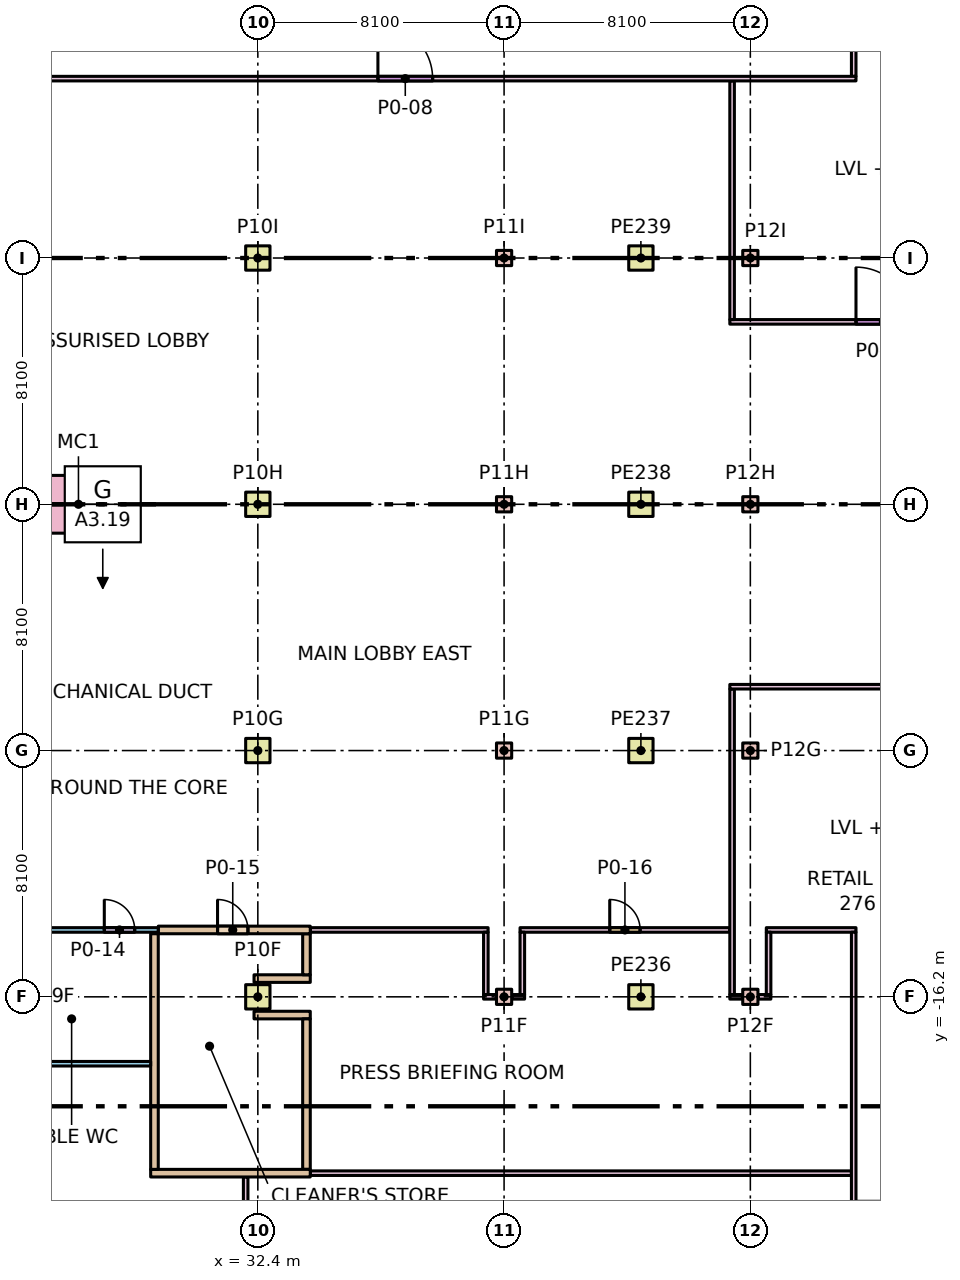
"""IFC4 building model, lengths in metres.
Left out: names, types, materials, properties, quantities, classifications, styles, units other than length and angle.
Written with IfcOpenShell. Run it as: python <this file> out.ifc"""

import sys

from ifc_helpers import new_model, si_unit, direction, frame, frame_2d, origin, origin_2d, place, context, subcontext, project, spatial, rectangle, extrude, element, fill, save


model = new_model("IFC4")
c1 = context("Model", 3, precision=1e-05, world=origin(), true_north=direction((0.0, 1.0)))
c2 = subcontext(c1, "Body", "Model", "MODEL_VIEW")
j1 = project(units=[si_unit("LENGTHUNIT", "METRE"), si_unit("PLANEANGLEUNIT", "RADIAN")], contexts=[c1])
p1 = place(None, origin())
s1 = spatial("IfcSite", under=j1, at=p1, CompositionType="ELEMENT")
p2 = place(p1, origin())
s2 = spatial("IfcBuilding", under=s1, at=p2, CompositionType="ELEMENT")
p3 = place(p2, origin())
s3 = spatial("IfcBuildingStorey", under=s2, at=p3, CompositionType="ELEMENT", Elevation=0.0)
for number, where, z_axis, x_axis in (
    (1, (32.4, -16.2, 0.0), (0.0, 0.0, 1.0), (1.0, 0.0, 0.0)),
    (2, (32.4, -8.1, 0.0), (0.0, 0.0, 1.0), (1.0, 0.0, 0.0)),
    (3, (32.4, 0.0, 0.0), (0.0, 0.0, 1.0), (1.0, 0.0, 0.0)),
    (4, (32.4, 8.1, 0.0), (0.0, 0.0, 1.0), (1.0, 0.0, 0.0)),
):
    element("IfcColumn", number, at=place(p3, frame(where, z_axis=z_axis, x_axis=x_axis)), inside=s3, PredefinedType="COLUMN", context=c2, shape_type="SweptSolid", body=[
        extrude(rectangle(XDim=0.8, YDim=0.8, at=origin_2d()), origin(), (0.0, 0.0, 1.0), 6.0),
    ])
for number, where, z_axis, x_axis in (
    (5, (40.5, -16.2, 0.0), (0.0, 0.0, 1.0), (1.0, 0.0, 0.0)),
    (6, (40.5, -8.1, 0.0), (0.0, 0.0, 1.0), (1.0, 0.0, 0.0)),
    (7, (40.5, 0.0, 0.0), (0.0, 0.0, 1.0), (1.0, 0.0, 0.0)),
    (8, (40.5, 8.1, 0.0), (0.0, 0.0, 1.0), (1.0, 0.0, 0.0)),
    (9, (48.6, -16.2, 0.0), (0.0, 0.0, 1.0), (1.0, 0.0, 0.0)),
    (10, (48.6, -8.1, 0.0), (0.0, 0.0, 1.0), (1.0, 0.0, 0.0)),
    (11, (48.6, 0.0, 0.0), (0.0, 0.0, 1.0), (1.0, 0.0, 0.0)),
    (12, (48.6, 8.1, 0.0), (0.0, 0.0, 1.0), (1.0, 0.0, 0.0)),
):
    element("IfcColumn", number, at=place(p3, frame(where, z_axis=z_axis, x_axis=x_axis)), inside=s3, PredefinedType="COLUMN", context=c2, shape_type="SweptSolid", body=[
        extrude(rectangle(XDim=0.5, YDim=0.5, at=origin_2d()), origin(), (0.0, 0.0, 1.0), 6.0),
    ])
for number, where, z_axis, x_axis in (
    (13, (45.0, -16.2, 0.0), (0.0, 0.0, 1.0), (1.0, 0.0, 0.0)),
    (14, (45.0, -8.1, 0.0), (0.0, 0.0, 1.0), (1.0, 0.0, 0.0)),
    (15, (45.0, 0.0, 0.0), (0.0, 0.0, 1.0), (1.0, 0.0, 0.0)),
    (16, (45.0, 8.1, 0.0), (0.0, 0.0, 1.0), (1.0, 0.0, 0.0)),
):
    element("IfcColumn", number, at=place(p3, frame(where, z_axis=z_axis, x_axis=x_axis)), inside=s3, PredefinedType="COLUMN", context=c2, shape_type="SweptSolid", body=[
        extrude(rectangle(XDim=0.8, YDim=0.8, at=origin_2d()), origin(), (0.0, 0.0, 1.0), 6.0),
    ])
p4 = place(p3, frame((26.5, 0.0, 0.0), z_axis=(0.0, 0.0, 1.0), x_axis=(0.0, 1.0, 0.0)))
e17 = element("IfcColumn", 17, at=p4, inside=s3, PredefinedType="COLUMN", context=c2, shape_type="SweptSolid", body=[
    extrude(rectangle(XDim=1.9, YDim=1.9, at=origin_2d()), origin(), (0.0, 0.0, 1.0), 6.0),
])
for number, where, z_axis, x_axis in (
    (18, (39.825, -16.2, 0.0), (0.0, 0.0, 1.0), (1.0, 0.0, 0.0)),
    (19, (40.76, -16.2, 0.0), (0.0, 0.0, 1.0), (1.0, 0.0, 0.0)),
):
    element("IfcWall", number, at=place(p3, frame(where, z_axis=z_axis, x_axis=x_axis)), inside=s3, PredefinedType="PARTITIONING", context=c2, shape_type="SweptSolid", body=[
        extrude(rectangle(XDim=0.415, YDim=0.15, at=frame_2d((0.208, 0.0))), origin(), (0.0, 0.0, 1.0), 5.68),
    ])
p5 = place(p3, frame((34.125, -14.0, 0.0), z_axis=(0.0, 0.0, 1.0), x_axis=(1.0, 0.0, 0.0)))
e20 = element("IfcWall", 20, at=p5, inside=s3, PredefinedType="PARTITIONING", context=c2, shape_type="SweptSolid", body=[
    extrude(rectangle(XDim=5.85, YDim=0.15, at=frame_2d((2.925, 0.0))), origin(), (0.0, 0.0, 1.0), 5.68),
])
p6 = place(p3, frame((41.025, -14.0, 0.0), z_axis=(0.0, 0.0, 1.0), x_axis=(1.0, 0.0, 0.0)))
e21 = element("IfcWall", 21, at=p6, inside=s3, PredefinedType="PARTITIONING", context=c2, shape_type="SweptSolid", body=[
    extrude(rectangle(XDim=6.9, YDim=0.15, at=frame_2d((3.45, 0.0))), origin(), (0.0, 0.0, 1.0), 5.68),
])
p7 = place(p6, frame((2.95, 0.0, 0.0)))
e22 = element("IfcOpeningElement", 22, at=p7, cuts=e21, PredefinedType="OPENING", context=c2, shape_type="SweptSolid", body=[
    extrude(rectangle(XDim=1.0, YDim=2.1, at=frame_2d((0.5, 1.05))), frame((0.0, 0.085, 0.0), z_axis=(0.0, -1.0, 0.0), x_axis=(1.0, 0.0, 0.0)), (0.0, 0.0, 1.0), 0.17),
])
for number, where, z_axis, x_axis in (
    (23, (39.9, -16.125, 0.0), (0.0, 0.0, 1.0), (0.0, 1.0, 0.0)),
    (24, (41.1, -16.125, 0.0), (0.0, 0.0, 1.0), (0.0, 1.0, 0.0)),
):
    element("IfcWall", number, at=place(p3, frame(where, z_axis=z_axis, x_axis=x_axis)), inside=s3, PredefinedType="PARTITIONING", context=c2, shape_type="SweptSolid", body=[
        extrude(rectangle(XDim=2.05, YDim=0.15, at=frame_2d((1.025, 0.0))), origin(), (0.0, 0.0, 1.0), 5.68),
    ])
for number, where, z_axis, x_axis in (
    (25, (32.275, -16.8, 0.0), (0.0, 0.0, 1.0), (1.0, 0.0, 0.0)),
    (26, (32.275, -15.6, 0.0), (0.0, 0.0, 1.0), (1.0, 0.0, 0.0)),
):
    element("IfcWall", number, at=place(p3, frame(where, z_axis=z_axis, x_axis=x_axis)), inside=s3, PredefinedType="PARTITIONING", context=c2, shape_type="SweptSolid", body=[
        extrude(rectangle(XDim=1.85, YDim=0.25, at=frame_2d((0.925, 0.0))), origin(), (0.0, 0.0, 1.0), 5.68),
    ])
p8 = place(p3, frame((34.0, -21.875, 0.0), z_axis=(0.0, 0.0, 1.0), x_axis=(0.0, 1.0, 0.0)))
e27 = element("IfcWall", 27, at=p8, inside=s3, PredefinedType="PARTITIONING", context=c2, shape_type="SweptSolid", body=[
    extrude(rectangle(XDim=4.95, YDim=0.25, at=frame_2d((2.475, 0.0))), origin(), (0.0, 0.0, 1.0), 5.68),
])
p9 = place(p3, frame((34.0, -15.475, 0.0), z_axis=(0.0, 0.0, 1.0), x_axis=(0.0, 1.0, 0.0)))
e28 = element("IfcWall", 28, at=p9, inside=s3, PredefinedType="PARTITIONING", context=c2, shape_type="SweptSolid", body=[
    extrude(rectangle(XDim=1.35, YDim=0.25, at=frame_2d((0.675, 0.0))), origin(), (0.0, 0.0, 1.0), 5.68),
])
p10 = place(p3, frame((47.925, -16.2, 0.0), z_axis=(0.0, 0.0, 1.0), x_axis=(1.0, 0.0, 0.0)))
e29 = element("IfcWall", 29, at=p10, inside=s3, PredefinedType="PARTITIONING", context=c2, shape_type="SweptSolid", body=[
    extrude(rectangle(XDim=0.415, YDim=0.15, at=frame_2d((0.208, 0.0))), origin(), (0.0, 0.0, 1.0), 5.68),
])
p11 = place(p3, frame((48.86, -16.2, 0.0), z_axis=(0.0, 0.0, 1.0), x_axis=(1.0, 0.0, 0.0)))
e30 = element("IfcWall", 30, at=p11, inside=s3, PredefinedType="PARTITIONING", context=c2, shape_type="SweptSolid", body=[
    extrude(rectangle(XDim=0.415, YDim=0.15, at=frame_2d((0.208, 0.0))), origin(), (0.0, 0.0, 1.0), 5.68),
])
p12 = place(p3, frame((49.125, -14.0, 0.0), z_axis=(0.0, 0.0, 1.0), x_axis=(1.0, 0.0, 0.0)))
e31 = element("IfcWall", 31, at=p12, inside=s3, PredefinedType="PARTITIONING", context=c2, shape_type="SweptSolid", body=[
    extrude(rectangle(XDim=2.95, YDim=0.15, at=frame_2d((1.475, 0.0))), origin(), (0.0, 0.0, 1.0), 5.68),
])
p13 = place(p3, frame((48.0, -16.125, 0.0), z_axis=(0.0, 0.0, 1.0), x_axis=(0.0, 1.0, 0.0)))
e32 = element("IfcWall", 32, at=p13, inside=s3, PredefinedType="PARTITIONING", context=c2, shape_type="SweptSolid", body=[
    extrude(rectangle(XDim=10.05, YDim=0.15, at=frame_2d((5.025, 0.0))), origin(), (0.0, 0.0, 1.0), 5.68),
])
p14 = place(p3, frame((49.2, -16.125, 0.0), z_axis=(0.0, 0.0, 1.0), x_axis=(0.0, 1.0, 0.0)))
e33 = element("IfcWall", 33, at=p14, inside=s3, PredefinedType="PARTITIONING", context=c2, shape_type="SweptSolid", body=[
    extrude(rectangle(XDim=2.05, YDim=0.15, at=frame_2d((1.025, 0.0))), origin(), (0.0, 0.0, 1.0), 5.68),
])
p15 = place(p3, frame((34.125, -22.0, 0.0), z_axis=(0.0, 0.0, 1.0), x_axis=(1.0, 0.0, 0.0)))
e34 = element("IfcWall", 34, at=p15, inside=s3, PredefinedType="PARTITIONING", context=c2, shape_type="SweptSolid", body=[
    extrude(rectangle(XDim=17.8, YDim=0.15, at=frame_2d((8.9, 0.0))), origin(), (0.0, 0.0, 1.0), 5.68),
])
p16 = place(p3, frame((47.925, 6.0, 0.0), z_axis=(0.0, 0.0, 1.0), x_axis=(1.0, 0.0, 0.0)))
e35 = element("IfcWall", 35, at=p16, inside=s3, PredefinedType="PARTITIONING", context=c2, shape_type="SweptSolid", body=[
    extrude(rectangle(XDim=10.1, YDim=0.15, at=frame_2d((5.05, 0.0))), origin(), (0.0, 0.0, 1.0), 5.68),
])
p17 = place(p16, frame((4.15, 0.0, 0.0)))
e36 = element("IfcOpeningElement", 36, at=p17, cuts=e35, PredefinedType="OPENING", context=c2, shape_type="SweptSolid", body=[
    extrude(rectangle(XDim=1.8, YDim=2.4, at=frame_2d((0.9, 1.2))), frame((0.0, 0.085, 0.0), z_axis=(0.0, -1.0, 0.0), x_axis=(1.0, 0.0, 0.0)), (0.0, 0.0, 1.0), 0.17),
])
p18 = place(p3, frame((52.0, 14.075, 0.0), z_axis=(0.0, 0.0, 1.0), x_axis=(0.0, 1.0, 0.0)))
e37 = element("IfcWall", 37, at=p18, inside=s3, PredefinedType="PARTITIONING", context=c2, shape_type="SweptSolid", body=[
    extrude(rectangle(XDim=9.85, YDim=0.15, at=frame_2d((4.925, 0.0))), origin(), (0.0, 0.0, 1.0), 5.68),
])
p19 = place(p3, frame((48.0, 6.075, 0.0), z_axis=(0.0, 0.0, 1.0), x_axis=(0.0, 1.0, 0.0)))
e38 = element("IfcWall", 38, at=p19, inside=s3, PredefinedType="PARTITIONING", context=c2, shape_type="SweptSolid", body=[
    extrude(rectangle(XDim=7.85, YDim=0.15, at=frame_2d((3.925, 0.0))), origin(), (0.0, 0.0, 1.0), 5.68),
])
p20 = place(p3, frame((47.925, -6.0, 0.0), z_axis=(0.0, 0.0, 1.0), x_axis=(1.0, 0.0, 0.0)))
e39 = element("IfcWall", 39, at=p20, inside=s3, PredefinedType="PARTITIONING", context=c2, shape_type="SweptSolid", body=[
    extrude(rectangle(XDim=10.1, YDim=0.15, at=frame_2d((5.05, 0.0))), origin(), (0.0, 0.0, 1.0), 5.68),
])
p21 = place(p3, frame((13.475, 14.0, 0.0), z_axis=(0.0, 0.0, 1.0), x_axis=(1.0, 0.0, 0.0)))
e40 = element("IfcWall", 40, at=p21, inside=s3, PredefinedType="PARTITIONING", context=c2, shape_type="SweptSolid", body=[
    extrude(rectangle(XDim=38.6, YDim=0.15, at=frame_2d((19.3, 0.0))), origin(), (0.0, 0.0, 1.0), 5.68),
])
p22 = place(p21, frame((22.875, 0.0, 0.0)))
e41 = element("IfcOpeningElement", 41, at=p22, cuts=e40, PredefinedType="OPENING", context=c2, shape_type="SweptSolid", body=[
    extrude(rectangle(XDim=1.8, YDim=2.4, at=frame_2d((0.9, 1.2))), frame((0.0, 0.085, 0.0), z_axis=(0.0, -1.0, 0.0), x_axis=(1.0, 0.0, 0.0)), (0.0, 0.0, 1.0), 0.17),
])
p23 = place(p3, frame((13.325, -14.0, 0.0), z_axis=(0.0, 0.0, 1.0), x_axis=(1.0, 0.0, 0.0)))
e42 = element("IfcWall", 42, at=p23, inside=s3, PredefinedType="PARTITIONING", context=c2, shape_type="SweptSolid", body=[
    extrude(rectangle(XDim=15.8, YDim=0.15, at=frame_2d((7.9, 0.0))), origin(), (0.0, 0.0, 1.0), 5.68),
])
p24 = place(p23, frame((4.85, 0.0, 0.0)))
e43 = element("IfcOpeningElement", 43, at=p24, cuts=e42, PredefinedType="OPENING", context=c2, shape_type="SweptSolid", body=[
    extrude(rectangle(XDim=1.0, YDim=2.1, at=frame_2d((0.5, 1.05))), frame((0.0, 0.085, 0.0), z_axis=(0.0, -1.0, 0.0), x_axis=(1.0, 0.0, 0.0)), (0.0, 0.0, 1.0), 0.17),
])
p25 = place(p23, frame((14.025, 0.0, 0.0)))
e44 = element("IfcOpeningElement", 44, at=p25, cuts=e42, PredefinedType="OPENING", context=c2, shape_type="SweptSolid", body=[
    extrude(rectangle(XDim=1.0, YDim=2.1, at=frame_2d((0.5, 1.05))), frame((0.0, 0.085, 0.0), z_axis=(0.0, -1.0, 0.0), x_axis=(1.0, 0.0, 0.0)), (0.0, 0.0, 1.0), 0.17),
])
p26 = place(p3, frame((29.125, -14.0, 0.0), z_axis=(0.0, 0.0, 1.0), x_axis=(1.0, 0.0, 0.0)))
e45 = element("IfcWall", 45, at=p26, inside=s3, PredefinedType="PARTITIONING", context=c2, shape_type="SweptSolid", body=[
    extrude(rectangle(XDim=5.0, YDim=0.25, at=frame_2d((2.5, 0.0))), origin(), (0.0, 0.0, 1.0), 5.68),
])
p27 = place(p26, frame((1.95, 0.0, 0.0)))
e46 = element("IfcOpeningElement", 46, at=p27, cuts=e45, PredefinedType="OPENING", context=c2, shape_type="SweptSolid", body=[
    extrude(rectangle(XDim=1.0, YDim=2.1, at=frame_2d((0.5, 1.05))), frame((0.0, 0.135, 0.0), z_axis=(0.0, -1.0, 0.0), x_axis=(1.0, 0.0, 0.0)), (0.0, 0.0, 1.0), 0.27),
])
p28 = place(p3, frame((24.075, -18.4, 0.0), z_axis=(0.0, 0.0, 1.0), x_axis=(1.0, 0.0, 0.0)))
e47 = element("IfcWall", 47, at=p28, inside=s3, PredefinedType="PARTITIONING", context=c2, shape_type="SweptSolid", body=[
    extrude(rectangle(XDim=4.8, YDim=0.15, at=frame_2d((2.4, 0.0))), origin(), (0.0, 0.0, 1.0), 5.68),
])
p29 = place(p3, frame((28.875, -22.0, 0.0), z_axis=(0.0, 0.0, 1.0), x_axis=(1.0, 0.0, 0.0)))
e48 = element("IfcWall", 48, at=p29, inside=s3, PredefinedType="PARTITIONING", context=c2, shape_type="SweptSolid", body=[
    extrude(rectangle(XDim=5.25, YDim=0.25, at=frame_2d((2.625, 0.0))), origin(), (0.0, 0.0, 1.0), 5.68),
])
p30 = place(p3, frame((29.0, -21.875, 0.0), z_axis=(0.0, 0.0, 1.0), x_axis=(0.0, 1.0, 0.0)))
e49 = element("IfcWall", 49, at=p30, inside=s3, PredefinedType="PARTITIONING", context=c2, shape_type="SweptSolid", body=[
    extrude(rectangle(XDim=7.75, YDim=0.25, at=frame_2d((3.875, 0.0))), origin(), (0.0, 0.0, 1.0), 5.68),
])
p31 = place(p3, frame((52.0, -43.5, 0.0), z_axis=(0.0, 0.0, 1.0), x_axis=(0.0, 1.0, 0.0)))
e50 = element("IfcWall", 50, at=p31, inside=s3, PredefinedType="PARTITIONING", context=c2, shape_type="SweptSolid", body=[
    extrude(rectangle(XDim=29.425, YDim=0.15, at=frame_2d((14.712, 0.0))), origin(), (0.0, 0.0, 1.0), 5.68),
])
p32 = place(p3, frame((32.0, -23.89, 0.0), z_axis=(0.0, 0.0, 1.0), x_axis=(0.0, 1.0, 0.0)))
e51 = element("IfcWall", 51, at=p32, inside=s3, PredefinedType="PARTITIONING", context=c2, shape_type="SweptSolid", body=[
    extrude(rectangle(XDim=1.765, YDim=0.15, at=frame_2d((0.882, 0.0))), origin(), (0.0, 0.0, 1.0), 5.68),
])
p33 = place(p22, origin())
e52 = element("IfcDoor", 52, at=p33, inside=s3, OperationType="SINGLE_SWING_LEFT", PredefinedType="DOOR", context=c2, shape_type="SweptSolid", body=[
    extrude(rectangle(XDim=1.8, YDim=2.4, at=frame_2d((0.9, 1.2))), frame((0.0, 0.025, 0.0), z_axis=(0.0, -1.0, 0.0), x_axis=(1.0, 0.0, 0.0)), (0.0, 0.0, 1.0), 0.05),
])
fill(e41, e52)
p34 = place(p17, origin())
e53 = element("IfcDoor", 53, at=p34, inside=s3, OperationType="SINGLE_SWING_LEFT", PredefinedType="DOOR", context=c2, shape_type="SweptSolid", body=[
    extrude(rectangle(XDim=1.8, YDim=2.4, at=frame_2d((0.9, 1.2))), frame((0.0, 0.025, 0.0), z_axis=(0.0, -1.0, 0.0), x_axis=(1.0, 0.0, 0.0)), (0.0, 0.0, 1.0), 0.05),
])
fill(e36, e53)
p35 = place(p25, origin())
e54 = element("IfcDoor", 54, at=p35, inside=s3, OperationType="SINGLE_SWING_LEFT", PredefinedType="DOOR", context=c2, shape_type="SweptSolid", body=[
    extrude(rectangle(XDim=1.0, YDim=2.1, at=frame_2d((0.5, 1.05))), frame((0.0, 0.025, 0.0), z_axis=(0.0, -1.0, 0.0), x_axis=(1.0, 0.0, 0.0)), (0.0, 0.0, 1.0), 0.05),
])
fill(e44, e54)
p36 = place(p27, origin())
e55 = element("IfcDoor", 55, at=p36, inside=s3, OperationType="SINGLE_SWING_LEFT", PredefinedType="DOOR", context=c2, shape_type="SweptSolid", body=[
    extrude(rectangle(XDim=1.0, YDim=2.1, at=frame_2d((0.5, 1.05))), frame((0.0, 0.025, 0.0), z_axis=(0.0, -1.0, 0.0), x_axis=(1.0, 0.0, 0.0)), (0.0, 0.0, 1.0), 0.05),
])
fill(e46, e55)
p37 = place(p7, origin())
e56 = element("IfcDoor", 56, at=p37, inside=s3, OperationType="SINGLE_SWING_LEFT", PredefinedType="DOOR", context=c2, shape_type="SweptSolid", body=[
    extrude(rectangle(XDim=1.0, YDim=2.1, at=frame_2d((0.5, 1.05))), frame((0.0, 0.025, 0.0), z_axis=(0.0, -1.0, 0.0), x_axis=(1.0, 0.0, 0.0)), (0.0, 0.0, 1.0), 0.05),
])
fill(e22, e56)
save(model, sys.argv[1])
